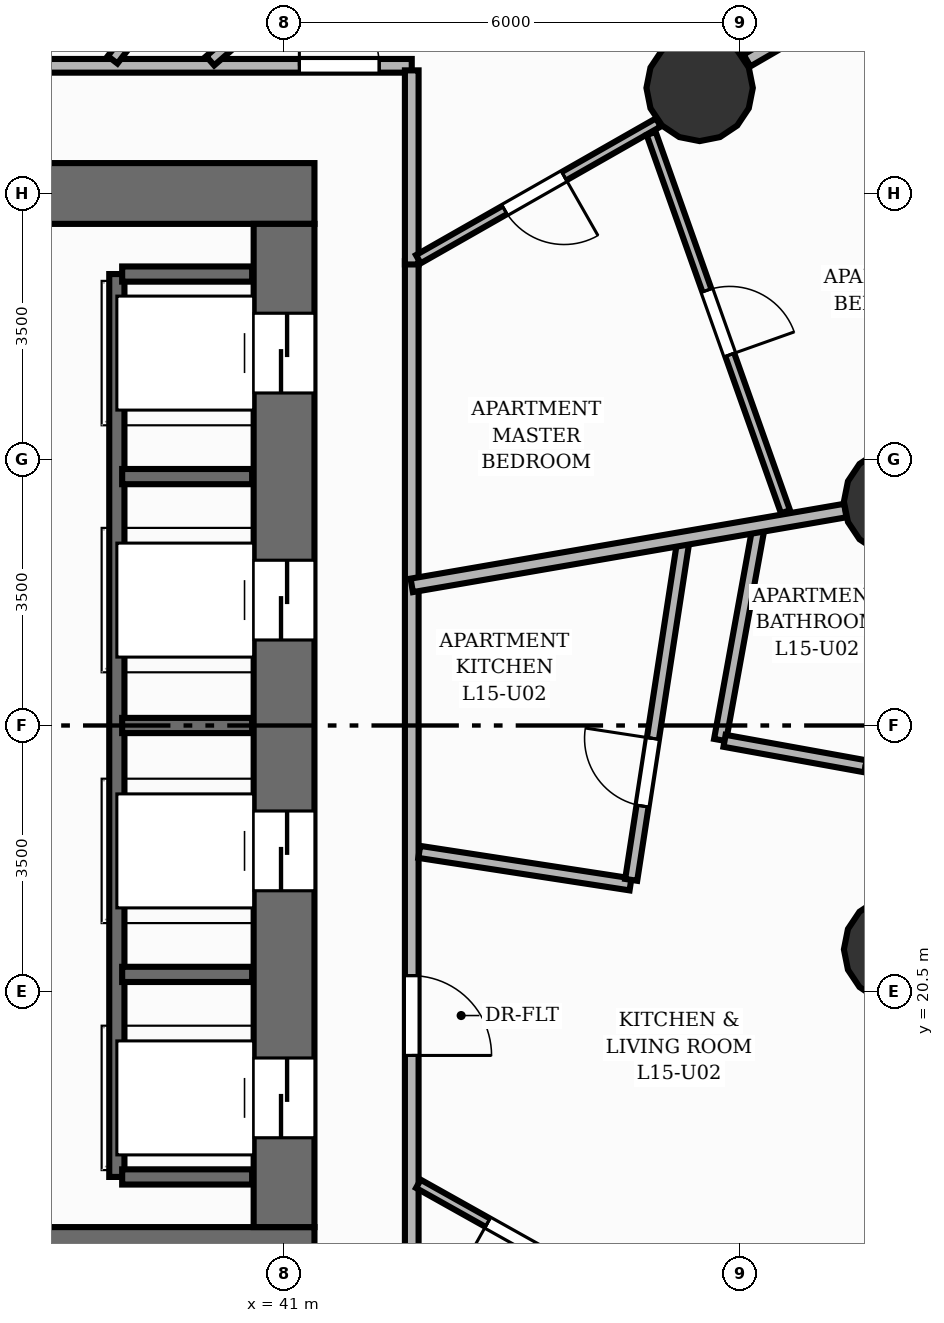
"""IFC4 building model, lengths in metres.
Left out: names, types, materials, properties, quantities, classifications, styles, units other than length and angle.
Written with IfcOpenShell. Run it as: python <this file> out.ifc"""

import sys

from ifc_helpers import new_model, si_unit, direction, frame, frame_2d, origin, origin_2d, place, context, subcontext, project, spatial, rectangle, circle, extrude, element, fill, save


model = new_model("IFC4")
c1 = context("Model", 3, precision=1e-05, world=origin(), true_north=direction((0.0, 1.0)))
c2 = subcontext(c1, "Body", "Model", "MODEL_VIEW")
j1 = project(units=[si_unit("LENGTHUNIT", "METRE"), si_unit("PLANEANGLEUNIT", "RADIAN")], contexts=[c1])
p1 = place(None, origin())
s1 = spatial("IfcSite", under=j1, at=p1, CompositionType="ELEMENT")
p2 = place(p1, origin())
s2 = spatial("IfcBuilding", under=s1, at=p2, CompositionType="ELEMENT")
p3 = place(p2, frame((0.0, 0.0, 53.6)))
s3 = spatial("IfcBuildingStorey", under=s2, at=p3, CompositionType="ELEMENT", Elevation=53.6)
p4 = place(p3, frame((22.6, 17.0, 0.0), z_axis=(0.0, 0.0, 1.0), x_axis=(1.0, 0.0, 0.0)))
e1 = element("IfcWall", 1, at=p4, inside=s3, PredefinedType="SHEAR", context=c2, shape_type="SweptSolid", body=[
    extrude(rectangle(XDim=18.8, YDim=0.8, at=frame_2d((9.4, 0.0))), origin(), (0.0, 0.0, 1.0), 3.2),
])
p5 = place(p4, frame((5.9, 0.0, 0.0)))
e2 = element("IfcOpeningElement", 2, at=p5, cuts=e1, PredefinedType="OPENING", context=c2, shape_type="SweptSolid", body=[
    extrude(rectangle(XDim=1.1, YDim=2.15, at=frame_2d((0.55, 1.075))), frame((0.0, 0.41, 0.0), z_axis=(0.0, -1.0, 0.0), x_axis=(1.0, 0.0, 0.0)), (0.0, 0.0, 1.0), 0.82),
])
p6 = place(p4, frame((9.45, 0.0, 0.0)))
e3 = element("IfcOpeningElement", 3, at=p6, cuts=e1, PredefinedType="OPENING", context=c2, shape_type="SweptSolid", body=[
    extrude(rectangle(XDim=0.9, YDim=2.1, at=frame_2d((0.45, 1.05))), frame((0.0, 0.41, 0.0), z_axis=(0.0, -1.0, 0.0), x_axis=(1.0, 0.0, 0.0)), (0.0, 0.0, 1.0), 0.82),
])
p7 = place(p3, frame((22.6, 31.0, 0.0), z_axis=(0.0, 0.0, 1.0), x_axis=(1.0, 0.0, 0.0)))
e4 = element("IfcWall", 4, at=p7, inside=s3, PredefinedType="SHEAR", context=c2, shape_type="SweptSolid", body=[
    extrude(rectangle(XDim=18.8, YDim=0.8, at=frame_2d((9.4, 0.0))), origin(), (0.0, 0.0, 1.0), 3.2),
])
p8 = place(p7, frame((11.8, 0.0, 0.0)))
e5 = element("IfcOpeningElement", 5, at=p8, cuts=e4, PredefinedType="OPENING", context=c2, shape_type="SweptSolid", body=[
    extrude(rectangle(XDim=1.1, YDim=2.15, at=frame_2d((0.55, 1.075))), frame((0.0, 0.41, 0.0), z_axis=(0.0, -1.0, 0.0), x_axis=(1.0, 0.0, 0.0)), (0.0, 0.0, 1.0), 0.82),
])
p9 = place(p3, frame((41.0, 17.4, 0.0), z_axis=(0.0, 0.0, 1.0), x_axis=(0.0, 1.0, 0.0)))
e6 = element("IfcWall", 6, at=p9, inside=s3, PredefinedType="SHEAR", context=c2, shape_type="SweptSolid", body=[
    extrude(rectangle(XDim=13.2, YDim=0.8, at=frame_2d((6.6, 0.0))), origin(), (0.0, 0.0, 1.0), 3.2),
])
p10 = place(p9, frame((1.175, 0.0, 0.0)))
e7 = element("IfcOpeningElement", 7, at=p10, cuts=e6, PredefinedType="OPENING", context=c2, shape_type="SweptSolid", body=[
    extrude(rectangle(XDim=1.05, YDim=2.15, at=frame_2d((0.525, 1.075))), frame((0.0, 0.41, 0.0), z_axis=(0.0, -1.0, 0.0), x_axis=(1.0, 0.0, 0.0)), (0.0, 0.0, 1.0), 0.82),
])
p11 = place(p9, frame((4.425, 0.0, 0.0)))
e8 = element("IfcOpeningElement", 8, at=p11, cuts=e6, PredefinedType="OPENING", context=c2, shape_type="SweptSolid", body=[
    extrude(rectangle(XDim=1.05, YDim=2.15, at=frame_2d((0.525, 1.075))), frame((0.0, 0.41, 0.0), z_axis=(0.0, -1.0, 0.0), x_axis=(1.0, 0.0, 0.0)), (0.0, 0.0, 1.0), 0.82),
])
p12 = place(p9, frame((7.725, 0.0, 0.0)))
e9 = element("IfcOpeningElement", 9, at=p12, cuts=e6, PredefinedType="OPENING", context=c2, shape_type="SweptSolid", body=[
    extrude(rectangle(XDim=1.05, YDim=2.15, at=frame_2d((0.525, 1.075))), frame((0.0, 0.41, 0.0), z_axis=(0.0, -1.0, 0.0), x_axis=(1.0, 0.0, 0.0)), (0.0, 0.0, 1.0), 0.82),
])
p13 = place(p9, frame((10.975, 0.0, 0.0)))
e10 = element("IfcOpeningElement", 10, at=p13, cuts=e6, PredefinedType="OPENING", context=c2, shape_type="SweptSolid", body=[
    extrude(rectangle(XDim=1.05, YDim=2.15, at=frame_2d((0.525, 1.075))), frame((0.0, 0.41, 0.0), z_axis=(0.0, -1.0, 0.0), x_axis=(1.0, 0.0, 0.0)), (0.0, 0.0, 1.0), 0.82),
])
for number, where, z_axis, x_axis in (
    (11, (49.066, 26.946, 0.0), (0.0, 0.0, 1.0), (1.0, 0.0, 0.0)),
    (12, (46.468, 32.389, 0.0), (0.0, 0.0, 1.0), (1.0, 0.0, 0.0)),
    (13, (49.066, 21.054, 0.0), (0.0, 0.0, 1.0), (1.0, 0.0, 0.0)),
):
    element("IfcColumn", number, at=place(p3, frame(where, z_axis=z_axis, x_axis=x_axis)), inside=s3, PredefinedType="COLUMN", context=c2, shape_type="SweptSolid", body=[
        extrude(circle(Radius=0.7, at=origin_2d()), origin(), (0.0, 0.0, 1.0), 3.2),
    ])
p14 = place(p3, frame((48.744, 33.777, 0.0), z_axis=(0.0, 0.0, 1.0), x_axis=(0.496155788519, -0.868233513243, 0.0)))
e14 = element("IfcWall", 14, at=p14, inside=s3, PredefinedType="SOLIDWALL", context=c2, shape_type="SweptSolid", body=[
    extrude(rectangle(XDim=3.121, YDim=0.25, at=frame_2d((1.56, 0.0))), origin(), (0.0, 0.0, 1.0), 2.96),
])
p15 = place(p14, frame((0.86, 0.0, 0.85)))
e15 = element("IfcOpeningElement", 15, at=p15, cuts=e14, PredefinedType="OPENING", context=c2, shape_type="SweptSolid", body=[
    extrude(rectangle(XDim=1.4, YDim=1.55, at=frame_2d((0.7, 0.775))), frame((0.0, 0.135, 0.0), z_axis=(0.0, -1.0, 0.0), x_axis=(1.0, 0.0, 0.0)), (0.0, 0.0, 1.0), 0.27),
])
p16 = place(p3, frame((38.8, 18.06, 0.0), z_axis=(0.0, 0.0, 1.0), x_axis=(0.0, 1.0, 0.0)))
e16 = element("IfcWall", 16, at=p16, inside=s3, PredefinedType="SHEAR", context=c2, shape_type="SweptSolid", body=[
    extrude(rectangle(XDim=11.88, YDim=0.2, at=frame_2d((5.94, 0.0))), origin(), (0.0, 0.0, 1.0), 3.2),
])
for number, where, z_axis, x_axis in (
    (17, (38.87, 18.06, 0.0), (0.0, 0.0, 1.0), (1.0, 0.0, 0.0)),
    (18, (38.87, 29.94, 0.0), (0.0, 0.0, 1.0), (1.0, 0.0, 0.0)),
    (19, (38.87, 20.725, 0.0), (0.0, 0.0, 1.0), (1.0, 0.0, 0.0)),
    (20, (38.87, 24.0, 0.0), (0.0, 0.0, 1.0), (1.0, 0.0, 0.0)),
    (21, (38.87, 27.275, 0.0), (0.0, 0.0, 1.0), (1.0, 0.0, 0.0)),
):
    element("IfcWall", number, at=place(p3, frame(where, z_axis=z_axis, x_axis=x_axis)), inside=s3, PredefinedType="SHEAR", context=c2, shape_type="SweptSolid", body=[
        extrude(rectangle(XDim=1.71, YDim=0.2, at=frame_2d((0.855, 0.0))), origin(), (0.0, 0.0, 1.0), 3.2),
    ])
p17 = place(p3, frame((47.091, 32.75, 0.0), z_axis=(0.0, 0.0, 1.0), x_axis=(0.865027823723, 0.501723892379, 0.0)))
e22 = element("IfcWall", 22, at=p17, inside=s3, PredefinedType="PARTITIONING", context=c2, shape_type="SweptSolid", body=[
    extrude(rectangle(XDim=1.889, YDim=0.18, at=frame_2d((0.944, 0.0))), origin(), (0.0, 0.0, 1.0), 2.178),
])
p18 = place(p3, frame((42.68, 30.109, 0.0), z_axis=(0.0, 0.0, 1.0), x_axis=(0.0, -1.0, 0.0)))
e23 = element("IfcWall", 23, at=p18, inside=s3, PredefinedType="PARTITIONING", context=c2, shape_type="SweptSolid", body=[
    extrude(rectangle(XDim=14.789, YDim=0.18, at=frame_2d((7.395, 0.0))), origin(), (0.0, 0.0, 1.0), 2.955),
])
p19 = place(p18, frame((9.4, 0.0, 0.0)))
e24 = element("IfcOpeningElement", 24, at=p19, cuts=e23, PredefinedType="OPENING", context=c2, shape_type="SweptSolid", body=[
    extrude(rectangle(XDim=1.05, YDim=2.15, at=frame_2d((0.525, 1.075))), frame((0.0, 0.1, 0.0), z_axis=(0.0, -1.0, 0.0), x_axis=(1.0, 0.0, 0.0)), (0.0, 0.0, 1.0), 0.2),
])
p20 = place(p3, frame((33.988, 32.68, 0.0), z_axis=(0.0, 0.0, 1.0), x_axis=(1.0, 0.0, 0.0)))
e25 = element("IfcWall", 25, at=p20, inside=s3, PredefinedType="PARTITIONING", context=c2, shape_type="SweptSolid", body=[
    extrude(rectangle(XDim=8.692, YDim=0.18, at=frame_2d((4.346, 0.0))), origin(), (0.0, 0.0, 1.0), 2.955),
])
p21 = place(p20, frame((7.213, 0.0, 0.0)))
e26 = element("IfcOpeningElement", 26, at=p21, cuts=e25, PredefinedType="OPENING", context=c2, shape_type="SweptSolid", body=[
    extrude(rectangle(XDim=1.05, YDim=2.15, at=frame_2d((0.525, 1.075))), frame((0.0, 0.1, 0.0), z_axis=(0.0, -1.0, 0.0), x_axis=(1.0, 0.0, 0.0)), (0.0, 0.0, 1.0), 0.2),
])
p22 = place(p3, frame((42.68, 32.62, 0.0), z_axis=(0.0, 0.0, 1.0), x_axis=(0.0, -1.0, 0.0)))
e27 = element("IfcWall", 27, at=p22, inside=s3, PredefinedType="PARTITIONING", context=c2, shape_type="SweptSolid", body=[
    extrude(rectangle(XDim=2.554, YDim=0.18, at=frame_2d((1.277, 0.0))), origin(), (0.0, 0.0, 1.0), 2.955),
])
p23 = place(p3, frame((47.248, 26.632, 0.0), z_axis=(0.0, 0.0, 1.0), x_axis=(-0.1781964362, -0.983994933994, 0.0)))
e28 = element("IfcWall", 28, at=p23, inside=s3, PredefinedType="PLUMBINGWALL", context=c2, shape_type="SweptSolid", body=[
    extrude(rectangle(XDim=2.869, YDim=0.16, at=frame_2d((1.435, 0.0))), origin(), (0.0, 0.0, 1.0), 2.955),
])
p24 = place(p3, frame((46.796, 23.799, 0.0), z_axis=(0.0, 0.0, 1.0), x_axis=(0.983988618973, -0.178231304015, 0.0)))
e29 = element("IfcWall", 29, at=p24, inside=s3, PredefinedType="PLUMBINGWALL", context=c2, shape_type="SweptSolid", body=[
    extrude(rectangle(XDim=4.631, YDim=0.16, at=frame_2d((2.316, 0.0))), origin(), (0.0, 0.0, 1.0), 2.955),
])
p25 = place(p24, frame((1.866, 0.0, 0.0)))
e30 = element("IfcOpeningElement", 30, at=p25, cuts=e29, PredefinedType="OPENING", context=c2, shape_type="SweptSolid", body=[
    extrude(rectangle(XDim=0.9, YDim=2.1, at=frame_2d((0.45, 1.05))), frame((0.0, 0.09, 0.0), z_axis=(0.0, -1.0, 0.0), x_axis=(1.0, 0.0, 0.0)), (0.0, 0.0, 1.0), 0.18),
])
p26 = place(p3, frame((46.011, 16.152, 0.0), z_axis=(0.0, 0.0, 1.0), x_axis=(-0.872501537555, 0.488611365978, 0.0)))
e31 = element("IfcWall", 31, at=p26, inside=s3, PredefinedType="PARTITIONING", context=c2, shape_type="SweptSolid", body=[
    extrude(rectangle(XDim=3.719, YDim=0.125, at=frame_2d((1.859, 0.0))), origin(), (0.0, 0.0, 1.0), 2.178),
])
p27 = place(p26, frame((1.773, 0.0, 0.0)))
e32 = element("IfcOpeningElement", 32, at=p27, cuts=e31, PredefinedType="OPENING", context=c2, shape_type="SweptSolid", body=[
    extrude(rectangle(XDim=0.9, YDim=2.1, at=frame_2d((0.45, 1.05))), frame((0.0, 0.073, 0.0), z_axis=(0.0, -1.0, 0.0), x_axis=(1.0, 0.0, 0.0)), (0.0, 0.0, 1.0), 0.145),
])
p28 = place(p3, frame((42.779, 22.337, 0.0), z_axis=(0.0, 0.0, 1.0), x_axis=(0.9883767157, -0.152024563351, 0.0)))
e33 = element("IfcWall", 33, at=p28, inside=s3, PredefinedType="PLUMBINGWALL", context=c2, shape_type="SweptSolid", body=[
    extrude(rectangle(XDim=2.812, YDim=0.16, at=frame_2d((1.406, 0.0))), origin(), (0.0, 0.0, 1.0), 2.178),
])
p29 = place(p3, frame((45.567, 21.969, 0.0), z_axis=(0.0, 0.0, 1.0), x_axis=(0.152061220482, 0.988371076684, 0.0)))
e34 = element("IfcWall", 34, at=p29, inside=s3, PredefinedType="PLUMBINGWALL", context=c2, shape_type="SweptSolid", body=[
    extrude(rectangle(XDim=4.545, YDim=0.16, at=frame_2d((2.273, 0.0))), origin(), (0.0, 0.0, 1.0), 2.955),
])
p30 = place(p29, frame((0.983, 0.0, 0.0)))
e35 = element("IfcOpeningElement", 35, at=p30, cuts=e34, PredefinedType="OPENING", context=c2, shape_type="SweptSolid", body=[
    extrude(rectangle(XDim=0.9, YDim=2.1, at=frame_2d((0.45, 1.05))), frame((0.0, 0.09, 0.0), z_axis=(0.0, -1.0, 0.0), x_axis=(1.0, 0.0, 0.0)), (0.0, 0.0, 1.0), 0.18),
])
p31 = place(p3, frame((42.68, 25.844, 0.0), z_axis=(0.0, 0.0, 1.0), x_axis=(0.985422105898, 0.170127226534, 0.0)))
e36 = element("IfcWall", 36, at=p31, inside=s3, PredefinedType="PARTITIONING", context=c2, shape_type="SweptSolid", body=[
    extrude(rectangle(XDim=5.789, YDim=0.18, at=frame_2d((2.895, 0.0))), origin(), (0.0, 0.0, 1.0), 2.178),
])
p32 = place(p3, frame((40.028, 32.746, 0.0), z_axis=(0.0, 0.0, 1.0), x_axis=(0.753328390337, 0.657644536442, 0.0)))
e37 = element("IfcWall", 37, at=p32, inside=s3, PredefinedType="PLUMBINGWALL", context=c2, shape_type="SweptSolid", body=[
    extrude(rectangle(XDim=6.876, YDim=0.16, at=frame_2d((3.438, 0.0))), origin(), (0.0, 0.0, 1.0), 2.955),
])
p33 = place(p32, frame((2.288, 0.0, 0.0)))
e38 = element("IfcOpeningElement", 38, at=p33, cuts=e37, PredefinedType="OPENING", context=c2, shape_type="SweptSolid", body=[
    extrude(rectangle(XDim=0.9, YDim=2.1, at=frame_2d((0.45, 1.05))), frame((0.0, 0.09, 0.0), z_axis=(0.0, -1.0, 0.0), x_axis=(1.0, 0.0, 0.0)), (0.0, 0.0, 1.0), 0.18),
])
p34 = place(p3, frame((45.925, 31.936, 0.0), z_axis=(0.0, 0.0, 1.0), x_axis=(-0.868837650683, -0.49509709831, 0.0)))
e39 = element("IfcWall", 39, at=p34, inside=s3, PredefinedType="PARTITIONING", context=c2, shape_type="SweptSolid", body=[
    extrude(rectangle(XDim=3.635, YDim=0.125, at=frame_2d((1.818, 0.0))), origin(), (0.0, 0.0, 1.0), 2.178),
])
p35 = place(p34, frame((1.428, 0.0, 0.0)))
e40 = element("IfcOpeningElement", 40, at=p35, cuts=e39, PredefinedType="OPENING", context=c2, shape_type="SweptSolid", body=[
    extrude(rectangle(XDim=0.9, YDim=2.1, at=frame_2d((0.45, 1.05))), frame((0.0, 0.073, 0.0), z_axis=(0.0, -1.0, 0.0), x_axis=(1.0, 0.0, 0.0)), (0.0, 0.0, 1.0), 0.145),
])
p36 = place(p3, frame((38.744, 32.759, 0.0), z_axis=(0.0, 0.0, 1.0), x_axis=(0.610079741913, 0.792340020766, 0.0)))
e41 = element("IfcWall", 41, at=p36, inside=s3, PredefinedType="PLUMBINGWALL", context=c2, shape_type="SweptSolid", body=[
    extrude(rectangle(XDim=4.092, YDim=0.16, at=frame_2d((2.046, 0.0))), origin(), (0.0, 0.0, 1.0), 2.178),
])
p37 = place(p3, frame((45.83, 31.79, 0.0), z_axis=(0.0, 0.0, 1.0), x_axis=(0.334664074365, -0.94233749651, 0.0)))
e42 = element("IfcWall", 42, at=p37, inside=s3, PredefinedType="PARTITIONING", context=c2, shape_type="SweptSolid", body=[
    extrude(rectangle(XDim=5.282, YDim=0.125, at=frame_2d((2.641, 0.0))), origin(), (0.0, 0.0, 1.0), 2.955),
])
p38 = place(p37, frame((2.191, 0.0, 0.0)))
e43 = element("IfcOpeningElement", 43, at=p38, cuts=e42, PredefinedType="OPENING", context=c2, shape_type="SweptSolid", body=[
    extrude(rectangle(XDim=0.9, YDim=2.1, at=frame_2d((0.45, 1.05))), frame((0.0, 0.073, 0.0), z_axis=(0.0, -1.0, 0.0), x_axis=(1.0, 0.0, 0.0)), (0.0, 0.0, 1.0), 0.145),
])
p39 = place(p10, origin())
e44 = element("IfcDoor", 44, at=p39, inside=s3, OperationType="DOUBLE_DOOR_SLIDING", PredefinedType="DOOR", context=c2, shape_type="SweptSolid", body=[
    extrude(rectangle(XDim=1.05, YDim=2.15, at=frame_2d((0.525, 1.075))), frame((0.0, 0.025, 0.0), z_axis=(0.0, -1.0, 0.0), x_axis=(1.0, 0.0, 0.0)), (0.0, 0.0, 1.0), 0.05),
])
fill(e7, e44)
p40 = place(p11, origin())
e45 = element("IfcDoor", 45, at=p40, inside=s3, OperationType="DOUBLE_DOOR_SLIDING", PredefinedType="DOOR", context=c2, shape_type="SweptSolid", body=[
    extrude(rectangle(XDim=1.05, YDim=2.15, at=frame_2d((0.525, 1.075))), frame((0.0, 0.025, 0.0), z_axis=(0.0, -1.0, 0.0), x_axis=(1.0, 0.0, 0.0)), (0.0, 0.0, 1.0), 0.05),
])
fill(e8, e45)
p41 = place(p12, origin())
e46 = element("IfcDoor", 46, at=p41, inside=s3, OperationType="DOUBLE_DOOR_SLIDING", PredefinedType="DOOR", context=c2, shape_type="SweptSolid", body=[
    extrude(rectangle(XDim=1.05, YDim=2.15, at=frame_2d((0.525, 1.075))), frame((0.0, 0.025, 0.0), z_axis=(0.0, -1.0, 0.0), x_axis=(1.0, 0.0, 0.0)), (0.0, 0.0, 1.0), 0.05),
])
fill(e9, e46)
p42 = place(p13, origin())
e47 = element("IfcDoor", 47, at=p42, inside=s3, OperationType="DOUBLE_DOOR_SLIDING", PredefinedType="DOOR", context=c2, shape_type="SweptSolid", body=[
    extrude(rectangle(XDim=1.05, YDim=2.15, at=frame_2d((0.525, 1.075))), frame((0.0, 0.025, 0.0), z_axis=(0.0, -1.0, 0.0), x_axis=(1.0, 0.0, 0.0)), (0.0, 0.0, 1.0), 0.05),
])
fill(e10, e47)
p43 = place(p19, origin())
e48 = element("IfcDoor", 48, at=p43, inside=s3, OperationType="SINGLE_SWING_RIGHT", PredefinedType="DOOR", context=c2, shape_type="SweptSolid", body=[
    extrude(rectangle(XDim=1.05, YDim=2.15, at=frame_2d((0.525, 1.075))), frame((0.0, 0.025, 0.0), z_axis=(0.0, -1.0, 0.0), x_axis=(1.0, 0.0, 0.0)), (0.0, 0.0, 1.0), 0.05),
])
fill(e24, e48)
p44 = place(p25, origin())
e49 = element("IfcDoor", 49, at=p44, inside=s3, OperationType="SINGLE_SWING_LEFT", PredefinedType="DOOR", context=c2, shape_type="SweptSolid", body=[
    extrude(rectangle(XDim=0.9, YDim=2.1, at=frame_2d((0.45, 1.05))), frame((0.0, 0.025, 0.0), z_axis=(0.0, -1.0, 0.0), x_axis=(1.0, 0.0, 0.0)), (0.0, 0.0, 1.0), 0.05),
])
fill(e30, e49)
p45 = place(p27, origin())
e50 = element("IfcDoor", 50, at=p45, inside=s3, OperationType="SINGLE_SWING_RIGHT", PredefinedType="DOOR", context=c2, shape_type="SweptSolid", body=[
    extrude(rectangle(XDim=0.9, YDim=2.1, at=frame_2d((0.45, 1.05))), frame((0.0, 0.025, 0.0), z_axis=(0.0, -1.0, 0.0), x_axis=(1.0, 0.0, 0.0)), (0.0, 0.0, 1.0), 0.05),
])
fill(e32, e50)
p46 = place(p30, origin())
e51 = element("IfcDoor", 51, at=p46, inside=s3, OperationType="SINGLE_SWING_RIGHT", PredefinedType="DOOR", context=c2, shape_type="SweptSolid", body=[
    extrude(rectangle(XDim=0.9, YDim=2.1, at=frame_2d((0.45, 1.05))), frame((0.0, 0.025, 0.0), z_axis=(0.0, -1.0, 0.0), x_axis=(1.0, 0.0, 0.0)), (0.0, 0.0, 1.0), 0.05),
])
fill(e35, e51)
p47 = place(p21, origin())
e52 = element("IfcDoor", 52, at=p47, inside=s3, OperationType="SINGLE_SWING_LEFT", PredefinedType="DOOR", context=c2, shape_type="SweptSolid", body=[
    extrude(rectangle(XDim=1.05, YDim=2.15, at=frame_2d((0.525, 1.075))), frame((0.0, 0.025, 0.0), z_axis=(0.0, -1.0, 0.0), x_axis=(1.0, 0.0, 0.0)), (0.0, 0.0, 1.0), 0.05),
])
fill(e26, e52)
p48 = place(p35, origin())
e53 = element("IfcDoor", 53, at=p48, inside=s3, OperationType="SINGLE_SWING_LEFT", PredefinedType="DOOR", context=c2, shape_type="SweptSolid", body=[
    extrude(rectangle(XDim=0.9, YDim=2.1, at=frame_2d((0.45, 1.05))), frame((0.0, 0.025, 0.0), z_axis=(0.0, -1.0, 0.0), x_axis=(1.0, 0.0, 0.0)), (0.0, 0.0, 1.0), 0.05),
])
fill(e40, e53)
p49 = place(p38, origin())
e54 = element("IfcDoor", 54, at=p49, inside=s3, OperationType="SINGLE_SWING_RIGHT", PredefinedType="DOOR", context=c2, shape_type="SweptSolid", body=[
    extrude(rectangle(XDim=0.9, YDim=2.1, at=frame_2d((0.45, 1.05))), frame((0.0, 0.025, 0.0), z_axis=(0.0, -1.0, 0.0), x_axis=(1.0, 0.0, 0.0)), (0.0, 0.0, 1.0), 0.05),
])
fill(e43, e54)
save(model, sys.argv[1])
